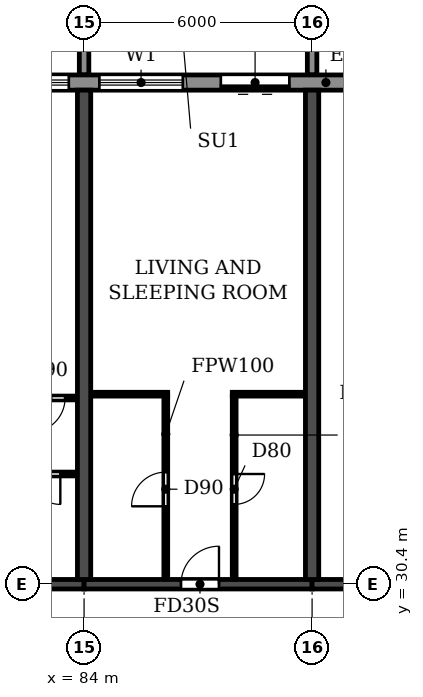
"""IFC4 building model, lengths in metres.
Left out: names, types, materials, properties, quantities, classifications, styles, units other than length and angle.
Written with IfcOpenShell. Run it as: python <this file> out.ifc"""

import sys

from ifc_helpers import new_model, si_unit, direction, frame, frame_2d, origin, place, context, subcontext, project, spatial, polyline, rectangle, outline, extrude, source, transform, mapped, element, fill, save


model = new_model("IFC4")
c1 = context("Model", 3, precision=1e-05, world=origin(), true_north=direction((0.0, 1.0)))
c2 = subcontext(c1, "Body", "Model", "MODEL_VIEW")
j1 = project(units=[si_unit("LENGTHUNIT", "METRE"), si_unit("PLANEANGLEUNIT", "RADIAN")], contexts=[c1])
p1 = place(None, origin())
s1 = spatial("IfcSite", under=j1, at=p1, CompositionType="ELEMENT")
p2 = place(p1, origin())
s2 = spatial("IfcBuilding", under=s1, at=p2, CompositionType="ELEMENT")
p3 = place(p2, frame((0.0, 0.0, 102.6)))
s3 = spatial("IfcBuildingStorey", under=s2, at=p3, CompositionType="ELEMENT", Elevation=102.6)
for number, where, z_axis, x_axis in (
    (1, (84.0, 30.525, 0.0), (0.0, 0.0, 1.0), (0.0, 1.0, 0.0)),
    (2, (90.0, 30.525, 0.0), (0.0, 0.0, 1.0), (0.0, 1.0, 0.0)),
):
    element("IfcWall", number, at=place(p3, frame(where, z_axis=z_axis, x_axis=x_axis)), inside=s3, PredefinedType="SHEAR", context=c2, shape_type="SweptSolid", body=[
        extrude(rectangle(XDim=12.875, YDim=0.35, at=frame_2d((6.438, 0.0))), origin(), (0.0, 0.0, 1.0), 3.0),
    ])
p4 = place(p3, frame((78.0, 30.4, 0.0), z_axis=(0.0, 0.0, 1.0), x_axis=(1.0, 0.0, 0.0)))
e3 = element("IfcWall", 3, at=p4, inside=s3, PredefinedType="SHEAR", context=c2, shape_type="SweptSolid", body=[
    extrude(rectangle(XDim=6.0, YDim=0.25, at=frame_2d((3.0, 0.0))), origin(), (0.0, 0.0, 1.0), 2.4),
])
p5 = place(p4, frame((2.55, 0.0, 0.0)))
e4 = element("IfcOpeningElement", 4, at=p5, cuts=e3, PredefinedType="OPENING", context=c2, shape_type="SweptSolid", body=[
    extrude(rectangle(XDim=1.0, YDim=2.1, at=frame_2d((0.5, 1.05))), frame((0.0, 0.135, 0.0), z_axis=(0.0, -1.0, 0.0), x_axis=(1.0, 0.0, 0.0)), (0.0, 0.0, 1.0), 0.27),
])
p6 = place(p3, frame((84.0, 30.4, 0.0), z_axis=(0.0, 0.0, 1.0), x_axis=(1.0, 0.0, 0.0)))
e5 = element("IfcWall", 5, at=p6, inside=s3, PredefinedType="SHEAR", context=c2, shape_type="SweptSolid", body=[
    extrude(rectangle(XDim=6.0, YDim=0.25, at=frame_2d((3.0, 0.0))), origin(), (0.0, 0.0, 1.0), 2.4),
])
p7 = place(p6, frame((2.55, 0.0, 0.0)))
e6 = element("IfcOpeningElement", 6, at=p7, cuts=e5, PredefinedType="OPENING", context=c2, shape_type="SweptSolid", body=[
    extrude(rectangle(XDim=1.0, YDim=2.1, at=frame_2d((0.5, 1.05))), frame((0.0, 0.135, 0.0), z_axis=(0.0, -1.0, 0.0), x_axis=(1.0, 0.0, 0.0)), (0.0, 0.0, 1.0), 0.27),
])
p8 = place(p3, frame((90.0, 30.4, 0.0), z_axis=(0.0, 0.0, 1.0), x_axis=(1.0, 0.0, 0.0)))
e7 = element("IfcWall", 7, at=p8, inside=s3, PredefinedType="SHEAR", context=c2, shape_type="SweptSolid", body=[
    extrude(rectangle(XDim=5.8, YDim=0.25, at=frame_2d((2.9, 0.0))), origin(), (0.0, 0.0, 1.0), 2.4),
])
p9 = place(p8, frame((2.5, 0.0, 0.0)))
e8 = element("IfcOpeningElement", 8, at=p9, cuts=e7, PredefinedType="OPENING", context=c2, shape_type="SweptSolid", body=[
    extrude(rectangle(XDim=1.0, YDim=2.1, at=frame_2d((0.5, 1.05))), frame((0.0, 0.135, 0.0), z_axis=(0.0, -1.0, 0.0), x_axis=(1.0, 0.0, 0.0)), (0.0, 0.0, 1.0), 0.27),
])
p10 = place(p3, frame((91.317, 43.6, 0.0), z_axis=(0.0, 0.0, 1.0), x_axis=(-1.0, 0.0, 0.0)))
e9 = element("IfcWall", 9, at=p10, inside=s3, PredefinedType="STANDARD", context=c2, shape_type="SweptSolid", body=[
    extrude(rectangle(XDim=80.634, YDim=0.4, at=frame_2d((40.317, 0.0))), origin(), (0.0, 0.0, 1.0), 3.0),
])
p11 = place(p10, frame((76.717, 0.0, 0.9)))
e10 = element("IfcOpeningElement", 10, at=p11, cuts=e9, PredefinedType="OPENING", context=c2, shape_type="SweptSolid", body=[
    extrude(rectangle(XDim=2.2, YDim=1.5, at=frame_2d((1.1, 0.75))), frame((0.0, 0.21, 0.0), z_axis=(0.0, -1.0, 0.0), x_axis=(1.0, 0.0, 0.0)), (0.0, 0.0, 1.0), 0.42),
])
p12 = place(p10, frame((73.917, 0.0, 0.0)))
e11 = element("IfcOpeningElement", 11, at=p12, cuts=e9, PredefinedType="OPENING", context=c2, shape_type="SweptSolid", body=[
    extrude(rectangle(XDim=1.8, YDim=2.4, at=frame_2d((0.9, 1.2))), frame((0.0, 0.21, 0.0), z_axis=(0.0, -1.0, 0.0), x_axis=(1.0, 0.0, 0.0)), (0.0, 0.0, 1.0), 0.42),
])
p13 = place(p10, frame((70.717, 0.0, 0.9)))
e12 = element("IfcOpeningElement", 12, at=p13, cuts=e9, PredefinedType="OPENING", context=c2, shape_type="SweptSolid", body=[
    extrude(rectangle(XDim=2.2, YDim=1.5, at=frame_2d((1.1, 0.75))), frame((0.0, 0.21, 0.0), z_axis=(0.0, -1.0, 0.0), x_axis=(1.0, 0.0, 0.0)), (0.0, 0.0, 1.0), 0.42),
])
p14 = place(p10, frame((67.717, 0.0, 0.9)))
e13 = element("IfcOpeningElement", 13, at=p14, cuts=e9, PredefinedType="OPENING", context=c2, shape_type="SweptSolid", body=[
    extrude(rectangle(XDim=2.2, YDim=1.5, at=frame_2d((1.1, 0.75))), frame((0.0, 0.21, 0.0), z_axis=(0.0, -1.0, 0.0), x_axis=(1.0, 0.0, 0.0)), (0.0, 0.0, 1.0), 0.42),
])
p15 = place(p10, frame((64.917, 0.0, 0.0)))
e14 = element("IfcOpeningElement", 14, at=p15, cuts=e9, PredefinedType="OPENING", context=c2, shape_type="SweptSolid", body=[
    extrude(rectangle(XDim=1.8, YDim=2.4, at=frame_2d((0.9, 1.2))), frame((0.0, 0.21, 0.0), z_axis=(0.0, -1.0, 0.0), x_axis=(1.0, 0.0, 0.0)), (0.0, 0.0, 1.0), 0.42),
])
p16 = place(p10, frame((61.717, 0.0, 0.9)))
e15 = element("IfcOpeningElement", 15, at=p16, cuts=e9, PredefinedType="OPENING", context=c2, shape_type="SweptSolid", body=[
    extrude(rectangle(XDim=2.2, YDim=1.5, at=frame_2d((1.1, 0.75))), frame((0.0, 0.21, 0.0), z_axis=(0.0, -1.0, 0.0), x_axis=(1.0, 0.0, 0.0)), (0.0, 0.0, 1.0), 0.42),
])
p17 = place(p10, frame((58.717, 0.0, 0.9)))
e16 = element("IfcOpeningElement", 16, at=p17, cuts=e9, PredefinedType="OPENING", context=c2, shape_type="SweptSolid", body=[
    extrude(rectangle(XDim=2.2, YDim=1.5, at=frame_2d((1.1, 0.75))), frame((0.0, 0.21, 0.0), z_axis=(0.0, -1.0, 0.0), x_axis=(1.0, 0.0, 0.0)), (0.0, 0.0, 1.0), 0.42),
])
p18 = place(p10, frame((55.717, 0.0, 0.9)))
e17 = element("IfcOpeningElement", 17, at=p18, cuts=e9, PredefinedType="OPENING", context=c2, shape_type="SweptSolid", body=[
    extrude(rectangle(XDim=2.2, YDim=1.5, at=frame_2d((1.1, 0.75))), frame((0.0, 0.21, 0.0), z_axis=(0.0, -1.0, 0.0), x_axis=(1.0, 0.0, 0.0)), (0.0, 0.0, 1.0), 0.42),
])
p19 = place(p10, frame((52.717, 0.0, 0.9)))
e18 = element("IfcOpeningElement", 18, at=p19, cuts=e9, PredefinedType="OPENING", context=c2, shape_type="SweptSolid", body=[
    extrude(rectangle(XDim=2.2, YDim=1.5, at=frame_2d((1.1, 0.75))), frame((0.0, 0.21, 0.0), z_axis=(0.0, -1.0, 0.0), x_axis=(1.0, 0.0, 0.0)), (0.0, 0.0, 1.0), 0.42),
])
p20 = place(p10, frame((49.917, 0.0, 0.0)))
e19 = element("IfcOpeningElement", 19, at=p20, cuts=e9, PredefinedType="OPENING", context=c2, shape_type="SweptSolid", body=[
    extrude(rectangle(XDim=1.8, YDim=2.4, at=frame_2d((0.9, 1.2))), frame((0.0, 0.21, 0.0), z_axis=(0.0, -1.0, 0.0), x_axis=(1.0, 0.0, 0.0)), (0.0, 0.0, 1.0), 0.42),
])
p21 = place(p10, frame((46.717, 0.0, 0.9)))
e20 = element("IfcOpeningElement", 20, at=p21, cuts=e9, PredefinedType="OPENING", context=c2, shape_type="SweptSolid", body=[
    extrude(rectangle(XDim=2.2, YDim=1.5, at=frame_2d((1.1, 0.75))), frame((0.0, 0.21, 0.0), z_axis=(0.0, -1.0, 0.0), x_axis=(1.0, 0.0, 0.0)), (0.0, 0.0, 1.0), 0.42),
])
p22 = place(p10, frame((43.917, 0.0, 0.0)))
e21 = element("IfcOpeningElement", 21, at=p22, cuts=e9, PredefinedType="OPENING", context=c2, shape_type="SweptSolid", body=[
    extrude(rectangle(XDim=1.8, YDim=2.4, at=frame_2d((0.9, 1.2))), frame((0.0, 0.21, 0.0), z_axis=(0.0, -1.0, 0.0), x_axis=(1.0, 0.0, 0.0)), (0.0, 0.0, 1.0), 0.42),
])
p23 = place(p10, frame((40.717, 0.0, 0.9)))
e22 = element("IfcOpeningElement", 22, at=p23, cuts=e9, PredefinedType="OPENING", context=c2, shape_type="SweptSolid", body=[
    extrude(rectangle(XDim=2.2, YDim=1.5, at=frame_2d((1.1, 0.75))), frame((0.0, 0.21, 0.0), z_axis=(0.0, -1.0, 0.0), x_axis=(1.0, 0.0, 0.0)), (0.0, 0.0, 1.0), 0.42),
])
p24 = place(p10, frame((37.717, 0.0, 0.9)))
e23 = element("IfcOpeningElement", 23, at=p24, cuts=e9, PredefinedType="OPENING", context=c2, shape_type="SweptSolid", body=[
    extrude(rectangle(XDim=2.2, YDim=1.5, at=frame_2d((1.1, 0.75))), frame((0.0, 0.21, 0.0), z_axis=(0.0, -1.0, 0.0), x_axis=(1.0, 0.0, 0.0)), (0.0, 0.0, 1.0), 0.42),
])
p25 = place(p10, frame((34.917, 0.0, 0.0)))
e24 = element("IfcOpeningElement", 24, at=p25, cuts=e9, PredefinedType="OPENING", context=c2, shape_type="SweptSolid", body=[
    extrude(rectangle(XDim=1.8, YDim=2.4, at=frame_2d((0.9, 1.2))), frame((0.0, 0.21, 0.0), z_axis=(0.0, -1.0, 0.0), x_axis=(1.0, 0.0, 0.0)), (0.0, 0.0, 1.0), 0.42),
])
p26 = place(p10, frame((31.717, 0.0, 0.9)))
e25 = element("IfcOpeningElement", 25, at=p26, cuts=e9, PredefinedType="OPENING", context=c2, shape_type="SweptSolid", body=[
    extrude(rectangle(XDim=2.2, YDim=1.5, at=frame_2d((1.1, 0.75))), frame((0.0, 0.21, 0.0), z_axis=(0.0, -1.0, 0.0), x_axis=(1.0, 0.0, 0.0)), (0.0, 0.0, 1.0), 0.42),
])
p27 = place(p10, frame((28.717, 0.0, 0.9)))
e26 = element("IfcOpeningElement", 26, at=p27, cuts=e9, PredefinedType="OPENING", context=c2, shape_type="SweptSolid", body=[
    extrude(rectangle(XDim=2.2, YDim=1.5, at=frame_2d((1.1, 0.75))), frame((0.0, 0.21, 0.0), z_axis=(0.0, -1.0, 0.0), x_axis=(1.0, 0.0, 0.0)), (0.0, 0.0, 1.0), 0.42),
])
p28 = place(p10, frame((25.917, 0.0, 0.0)))
e27 = element("IfcOpeningElement", 27, at=p28, cuts=e9, PredefinedType="OPENING", context=c2, shape_type="SweptSolid", body=[
    extrude(rectangle(XDim=1.8, YDim=2.4, at=frame_2d((0.9, 1.2))), frame((0.0, 0.21, 0.0), z_axis=(0.0, -1.0, 0.0), x_axis=(1.0, 0.0, 0.0)), (0.0, 0.0, 1.0), 0.42),
])
p29 = place(p10, frame((22.717, 0.0, 0.9)))
e28 = element("IfcOpeningElement", 28, at=p29, cuts=e9, PredefinedType="OPENING", context=c2, shape_type="SweptSolid", body=[
    extrude(rectangle(XDim=2.2, YDim=1.5, at=frame_2d((1.1, 0.75))), frame((0.0, 0.21, 0.0), z_axis=(0.0, -1.0, 0.0), x_axis=(1.0, 0.0, 0.0)), (0.0, 0.0, 1.0), 0.42),
])
p30 = place(p10, frame((19.717, 0.0, 0.9)))
e29 = element("IfcOpeningElement", 29, at=p30, cuts=e9, PredefinedType="OPENING", context=c2, shape_type="SweptSolid", body=[
    extrude(rectangle(XDim=2.2, YDim=1.5, at=frame_2d((1.1, 0.75))), frame((0.0, 0.21, 0.0), z_axis=(0.0, -1.0, 0.0), x_axis=(1.0, 0.0, 0.0)), (0.0, 0.0, 1.0), 0.42),
])
p31 = place(p10, frame((16.917, 0.0, 0.0)))
e30 = element("IfcOpeningElement", 30, at=p31, cuts=e9, PredefinedType="OPENING", context=c2, shape_type="SweptSolid", body=[
    extrude(rectangle(XDim=1.8, YDim=2.4, at=frame_2d((0.9, 1.2))), frame((0.0, 0.21, 0.0), z_axis=(0.0, -1.0, 0.0), x_axis=(1.0, 0.0, 0.0)), (0.0, 0.0, 1.0), 0.42),
])
p32 = place(p10, frame((13.717, 0.0, 0.9)))
e31 = element("IfcOpeningElement", 31, at=p32, cuts=e9, PredefinedType="OPENING", context=c2, shape_type="SweptSolid", body=[
    extrude(rectangle(XDim=2.2, YDim=1.5, at=frame_2d((1.1, 0.75))), frame((0.0, 0.21, 0.0), z_axis=(0.0, -1.0, 0.0), x_axis=(1.0, 0.0, 0.0)), (0.0, 0.0, 1.0), 0.42),
])
p33 = place(p10, frame((10.917, 0.0, 0.0)))
e32 = element("IfcOpeningElement", 32, at=p33, cuts=e9, PredefinedType="OPENING", context=c2, shape_type="SweptSolid", body=[
    extrude(rectangle(XDim=1.8, YDim=2.4, at=frame_2d((0.9, 1.2))), frame((0.0, 0.21, 0.0), z_axis=(0.0, -1.0, 0.0), x_axis=(1.0, 0.0, 0.0)), (0.0, 0.0, 1.0), 0.42),
])
p34 = place(p10, frame((7.717, 0.0, 0.9)))
e33 = element("IfcOpeningElement", 33, at=p34, cuts=e9, PredefinedType="OPENING", context=c2, shape_type="SweptSolid", body=[
    extrude(rectangle(XDim=2.2, YDim=1.5, at=frame_2d((1.1, 0.75))), frame((0.0, 0.21, 0.0), z_axis=(0.0, -1.0, 0.0), x_axis=(1.0, 0.0, 0.0)), (0.0, 0.0, 1.0), 0.42),
])
p35 = place(p10, frame((4.717, 0.0, 0.9)))
e34 = element("IfcOpeningElement", 34, at=p35, cuts=e9, PredefinedType="OPENING", context=c2, shape_type="SweptSolid", body=[
    extrude(rectangle(XDim=2.2, YDim=1.5, at=frame_2d((1.1, 0.75))), frame((0.0, 0.21, 0.0), z_axis=(0.0, -1.0, 0.0), x_axis=(1.0, 0.0, 0.0)), (0.0, 0.0, 1.0), 0.42),
])
p36 = place(p10, frame((1.917, 0.0, 0.0)))
e35 = element("IfcOpeningElement", 35, at=p36, cuts=e9, PredefinedType="OPENING", context=c2, shape_type="SweptSolid", body=[
    extrude(rectangle(XDim=1.8, YDim=2.4, at=frame_2d((0.9, 1.2))), frame((0.0, 0.21, 0.0), z_axis=(0.0, -1.0, 0.0), x_axis=(1.0, 0.0, 0.0)), (0.0, 0.0, 1.0), 0.42),
])
m1 = source(origin(), c2, "Body", "SweptSolid", [
    extrude(outline(polyline([(0.0, 0.0), (0.25, 0.0), (0.25, 3.1), (0.0, 3.1), (0.0, 0.0)])), origin(), (0.0, 0.0, 1.0), 3.1),
])
for number, where in (
    (36, (83.875, 43.8, 0.0)),
    (37, (89.875, 43.8, 0.0)),
):
    element("IfcWall", number, at=place(p3, frame(where)), inside=s3, PredefinedType="STANDARD", context=c2, shape_type="MappedRepresentation", body=[
        mapped(m1, transform((0.0, 0.0, 0.0))),
    ])
p37 = place(p3, frame((81.9, 33.3, 0.0), z_axis=(0.0, 0.0, 1.0), x_axis=(1.0, 0.0, 0.0)))
e38 = element("IfcWall", 38, at=p37, inside=s3, PredefinedType="PARTITIONING", context=c2, shape_type="SweptSolid", body=[
    extrude(rectangle(XDim=1.915, YDim=0.1, at=frame_2d((0.958, 0.0))), origin(), (0.0, 0.0, 1.0), 3.0),
])
p38 = place(p37, frame((0.675, 0.0, 0.0)))
e39 = element("IfcOpeningElement", 39, at=p38, cuts=e38, PredefinedType="OPENING", context=c2, shape_type="SweptSolid", body=[
    extrude(rectangle(XDim=0.8, YDim=2.1, at=frame_2d((0.4, 1.05))), frame((0.0, 0.06, 0.0), z_axis=(0.0, -1.0, 0.0), x_axis=(1.0, 0.0, 0.0)), (0.0, 0.0, 1.0), 0.12),
])
p39 = place(p3, frame((80.95, 35.3, 0.0), z_axis=(0.0, 0.0, 1.0), x_axis=(1.0, 0.0, 0.0)))
e40 = element("IfcWall", 40, at=p39, inside=s3, PredefinedType="PARTITIONING", context=c2, shape_type="SweptSolid", body=[
    extrude(rectangle(XDim=2.865, YDim=0.1, at=frame_2d((1.433, 0.0))), origin(), (0.0, 0.0, 1.0), 3.0),
])
p40 = place(p39, frame((1.65, 0.0, 0.0)))
e41 = element("IfcOpeningElement", 41, at=p40, cuts=e40, PredefinedType="OPENING", context=c2, shape_type="SweptSolid", body=[
    extrude(rectangle(XDim=0.9, YDim=2.1, at=frame_2d((0.45, 1.05))), frame((0.0, 0.06, 0.0), z_axis=(0.0, -1.0, 0.0), x_axis=(1.0, 0.0, 0.0)), (0.0, 0.0, 1.0), 0.12),
])
p41 = place(p3, frame((84.185, 35.4, 0.0), z_axis=(0.0, 0.0, 1.0), x_axis=(1.0, 0.0, 0.0)))
e42 = element("IfcWall", 42, at=p41, inside=s3, PredefinedType="PARTITIONING", context=c2, shape_type="SweptSolid", body=[
    extrude(rectangle(XDim=2.015, YDim=0.1, at=frame_2d((1.007, 0.0))), origin(), (0.0, 0.0, 1.0), 3.0),
])
p42 = place(p3, frame((87.9, 35.4, 0.0), z_axis=(0.0, 0.0, 1.0), x_axis=(1.0, 0.0, 0.0)))
e43 = element("IfcWall", 43, at=p42, inside=s3, PredefinedType="PARTITIONING", context=c2, shape_type="SweptSolid", body=[
    extrude(rectangle(XDim=1.915, YDim=0.1, at=frame_2d((0.958, 0.0))), origin(), (0.0, 0.0, 1.0), 3.0),
])
p43 = place(p3, frame((86.15, 30.535, 0.0), z_axis=(0.0, 0.0, 1.0), x_axis=(0.0, 1.0, 0.0)))
e44 = element("IfcWall", 44, at=p43, inside=s3, PredefinedType="PARTITIONING", context=c2, shape_type="SweptSolid", body=[
    extrude(rectangle(XDim=4.815, YDim=0.1, at=frame_2d((2.408, 0.0))), origin(), (0.0, 0.0, 1.0), 3.0),
])
p44 = place(p43, frame((1.915, 0.0, 0.0)))
e45 = element("IfcOpeningElement", 45, at=p44, cuts=e44, PredefinedType="OPENING", context=c2, shape_type="SweptSolid", body=[
    extrude(rectangle(XDim=0.9, YDim=2.1, at=frame_2d((0.45, 1.05))), frame((0.0, 0.06, 0.0), z_axis=(0.0, -1.0, 0.0), x_axis=(1.0, 0.0, 0.0)), (0.0, 0.0, 1.0), 0.12),
])
p45 = place(p3, frame((87.95, 30.535, 0.0), z_axis=(0.0, 0.0, 1.0), x_axis=(0.0, 1.0, 0.0)))
e46 = element("IfcWall", 46, at=p45, inside=s3, PredefinedType="PARTITIONING", context=c2, shape_type="SweptSolid", body=[
    extrude(rectangle(XDim=4.815, YDim=0.1, at=frame_2d((2.408, 0.0))), origin(), (0.0, 0.0, 1.0), 3.0),
])
p46 = place(p45, frame((1.965, 0.0, 0.0)))
e47 = element("IfcOpeningElement", 47, at=p46, cuts=e46, PredefinedType="OPENING", context=c2, shape_type="SweptSolid", body=[
    extrude(rectangle(XDim=0.8, YDim=2.1, at=frame_2d((0.4, 1.05))), frame((0.0, 0.06, 0.0), z_axis=(0.0, -1.0, 0.0), x_axis=(1.0, 0.0, 0.0)), (0.0, 0.0, 1.0), 0.12),
])
p47 = place(p34, origin())
e48 = element("IfcWindow", 48, at=p47, inside=s3, PartitioningType="DOUBLE_PANEL_HORIZONTAL", PredefinedType="WINDOW", context=c2, shape_type="SweptSolid", body=[
    extrude(rectangle(XDim=2.2, YDim=1.5, at=frame_2d((1.1, 0.75))), frame((0.0, 0.03, 0.0), z_axis=(0.0, -1.0, 0.0), x_axis=(1.0, 0.0, 0.0)), (0.0, 0.0, 1.0), 0.06),
])
fill(e33, e48)
p48 = place(p35, origin())
e49 = element("IfcWindow", 49, at=p48, inside=s3, PartitioningType="DOUBLE_PANEL_HORIZONTAL", PredefinedType="WINDOW", context=c2, shape_type="SweptSolid", body=[
    extrude(rectangle(XDim=2.2, YDim=1.5, at=frame_2d((1.1, 0.75))), frame((0.0, 0.03, 0.0), z_axis=(0.0, -1.0, 0.0), x_axis=(1.0, 0.0, 0.0)), (0.0, 0.0, 1.0), 0.06),
])
fill(e34, e49)
p49 = place(p36, origin())
e50 = element("IfcDoor", 50, at=p49, inside=s3, OperationType="DOUBLE_DOOR_SLIDING", PredefinedType="DOOR", context=c2, shape_type="SweptSolid", body=[
    extrude(rectangle(XDim=1.8, YDim=2.4, at=frame_2d((0.9, 1.2))), frame((0.0, 0.025, 0.0), z_axis=(0.0, -1.0, 0.0), x_axis=(1.0, 0.0, 0.0)), (0.0, 0.0, 1.0), 0.05),
])
fill(e35, e50)
p50 = place(p38, frame((0.8, 0.0, 0.0), z_axis=(0.0, 0.0, 1.0), x_axis=(-1.0, 0.0, 0.0)))
e51 = element("IfcDoor", 51, at=p50, inside=s3, OperationType="SINGLE_SWING_LEFT", PredefinedType="DOOR", context=c2, shape_type="SweptSolid", body=[
    extrude(rectangle(XDim=0.8, YDim=2.1, at=frame_2d((0.4, 1.05))), frame((0.0, 0.025, 0.0), z_axis=(0.0, -1.0, 0.0), x_axis=(1.0, 0.0, 0.0)), (0.0, 0.0, 1.0), 0.05),
])
fill(e39, e51)
p51 = place(p40, frame((0.9, 0.0, 0.0), z_axis=(0.0, 0.0, 1.0), x_axis=(-1.0, 0.0, 0.0)))
e52 = element("IfcDoor", 52, at=p51, inside=s3, OperationType="SINGLE_SWING_RIGHT", PredefinedType="DOOR", context=c2, shape_type="SweptSolid", body=[
    extrude(rectangle(XDim=0.9, YDim=2.1, at=frame_2d((0.45, 1.05))), frame((0.0, 0.025, 0.0), z_axis=(0.0, -1.0, 0.0), x_axis=(1.0, 0.0, 0.0)), (0.0, 0.0, 1.0), 0.05),
])
fill(e41, e52)
p52 = place(p44, origin())
e53 = element("IfcDoor", 53, at=p52, inside=s3, OperationType="SINGLE_SWING_LEFT", PredefinedType="DOOR", context=c2, shape_type="SweptSolid", body=[
    extrude(rectangle(XDim=0.9, YDim=2.1, at=frame_2d((0.45, 1.05))), frame((0.0, 0.025, 0.0), z_axis=(0.0, -1.0, 0.0), x_axis=(1.0, 0.0, 0.0)), (0.0, 0.0, 1.0), 0.05),
])
fill(e45, e53)
p53 = place(p7, origin())
e54 = element("IfcDoor", 54, at=p53, inside=s3, OperationType="SINGLE_SWING_RIGHT", PredefinedType="DOOR", context=c2, shape_type="SweptSolid", body=[
    extrude(rectangle(XDim=1.0, YDim=2.1, at=frame_2d((0.5, 1.05))), frame((0.0, 0.025, 0.0), z_axis=(0.0, -1.0, 0.0), x_axis=(1.0, 0.0, 0.0)), (0.0, 0.0, 1.0), 0.05),
])
fill(e6, e54)
p54 = place(p46, frame((0.8, 0.0, 0.0), z_axis=(0.0, 0.0, 1.0), x_axis=(-1.0, 0.0, 0.0)))
e55 = element("IfcDoor", 55, at=p54, inside=s3, OperationType="SINGLE_SWING_LEFT", PredefinedType="DOOR", context=c2, shape_type="SweptSolid", body=[
    extrude(rectangle(XDim=0.8, YDim=2.1, at=frame_2d((0.4, 1.05))), frame((0.0, 0.025, 0.0), z_axis=(0.0, -1.0, 0.0), x_axis=(1.0, 0.0, 0.0)), (0.0, 0.0, 1.0), 0.05),
])
fill(e47, e55)
save(model, sys.argv[1])
